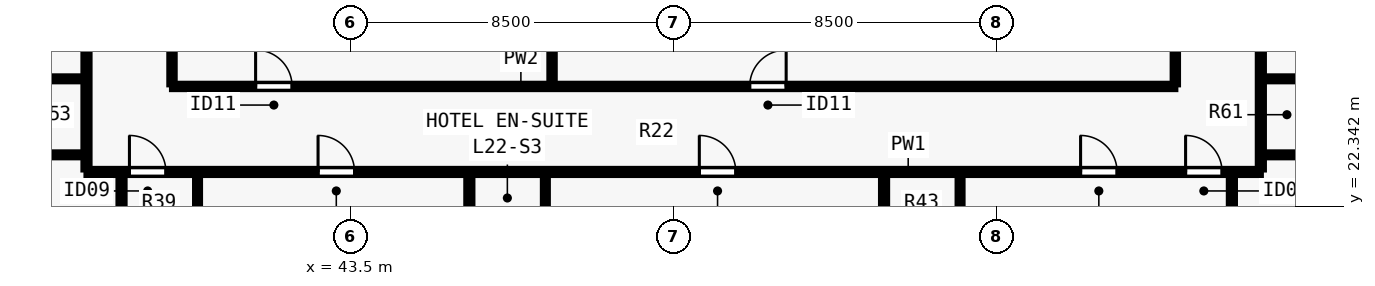
"""IFC4 building model, lengths in metres.
Left out: names, types, materials, properties, quantities, classifications, styles, units other than length and angle.
Written with IfcOpenShell. Run it as: python <this file> out.ifc"""

import sys

from ifc_helpers import new_model, si_unit, direction, frame, frame_2d, origin, place, context, subcontext, project, spatial, rectangle, extrude, element, fill, save


model = new_model("IFC4")
c1 = context("Model", 3, precision=1e-05, world=origin(), true_north=direction((0.0, 1.0)))
c2 = subcontext(c1, "Body", "Model", "MODEL_VIEW")
j1 = project(units=[si_unit("LENGTHUNIT", "METRE"), si_unit("PLANEANGLEUNIT", "RADIAN")], contexts=[c1])
p1 = place(None, origin())
s1 = spatial("IfcSite", under=j1, at=p1, CompositionType="ELEMENT")
p2 = place(p1, origin())
s2 = spatial("IfcBuilding", under=s1, at=p2, CompositionType="ELEMENT")
p3 = place(p2, frame((0.0, 0.0, 83.0)))
s3 = spatial("IfcBuildingStorey", under=s2, at=p3, CompositionType="ELEMENT", Elevation=83.0)
p4 = place(p3, frame((36.55, 23.25, 0.0), z_axis=(0.0, 0.0, 1.0), x_axis=(1.0, 0.0, 0.0)))
e1 = element("IfcWall", 1, at=p4, inside=s3, PredefinedType="PARTITIONING", context=c2, shape_type="SweptSolid", body=[
    extrude(rectangle(XDim=30.9, YDim=0.16, at=frame_2d((15.45, 0.0))), origin(), (0.0, 0.0, 1.0), 3.28),
])
p5 = place(p4, frame((1.13, 0.0, 0.0)))
e2 = element("IfcOpeningElement", 2, at=p5, cuts=e1, PredefinedType="OPENING", context=c2, shape_type="SweptSolid", body=[
    extrude(rectangle(XDim=0.96, YDim=2.15, at=frame_2d((0.48, 1.075))), frame((0.0, 0.09, 0.0), z_axis=(0.0, -1.0, 0.0), x_axis=(1.0, 0.0, 0.0)), (0.0, 0.0, 1.0), 0.18),
])
p6 = place(p4, frame((6.093, 0.0, 0.0)))
e3 = element("IfcOpeningElement", 3, at=p6, cuts=e1, PredefinedType="OPENING", context=c2, shape_type="SweptSolid", body=[
    extrude(rectangle(XDim=0.96, YDim=2.15, at=frame_2d((0.48, 1.075))), frame((0.0, 0.09, 0.0), z_axis=(0.0, -1.0, 0.0), x_axis=(1.0, 0.0, 0.0)), (0.0, 0.0, 1.0), 0.18),
])
p7 = place(p4, frame((16.125, 0.0, 0.0)))
e4 = element("IfcOpeningElement", 4, at=p7, cuts=e1, PredefinedType="OPENING", context=c2, shape_type="SweptSolid", body=[
    extrude(rectangle(XDim=0.96, YDim=2.15, at=frame_2d((0.48, 1.075))), frame((0.0, 0.09, 0.0), z_axis=(0.0, -1.0, 0.0), x_axis=(1.0, 0.0, 0.0)), (0.0, 0.0, 1.0), 0.18),
])
p8 = place(p4, frame((26.157, 0.0, 0.0)))
e5 = element("IfcOpeningElement", 5, at=p8, cuts=e1, PredefinedType="OPENING", context=c2, shape_type="SweptSolid", body=[
    extrude(rectangle(XDim=0.96, YDim=2.15, at=frame_2d((0.48, 1.075))), frame((0.0, 0.09, 0.0), z_axis=(0.0, -1.0, 0.0), x_axis=(1.0, 0.0, 0.0)), (0.0, 0.0, 1.0), 0.18),
])
p9 = place(p4, frame((28.92, 0.0, 0.0)))
e6 = element("IfcOpeningElement", 6, at=p9, cuts=e1, PredefinedType="OPENING", context=c2, shape_type="SweptSolid", body=[
    extrude(rectangle(XDim=0.96, YDim=2.15, at=frame_2d((0.48, 1.075))), frame((0.0, 0.09, 0.0), z_axis=(0.0, -1.0, 0.0), x_axis=(1.0, 0.0, 0.0)), (0.0, 0.0, 1.0), 0.18),
])
p10 = place(p3, frame((36.55, 23.315, 0.0), z_axis=(0.0, 0.0, 1.0), x_axis=(0.0, 1.0, 0.0)))
e7 = element("IfcWall", 7, at=p10, inside=s3, PredefinedType="PARTITIONING", context=c2, shape_type="SweptSolid", body=[
    extrude(rectangle(XDim=31.37, YDim=0.16, at=frame_2d((15.685, 0.0))), origin(), (0.0, 0.0, 1.0), 3.28),
])
p11 = place(p10, frame((4.848, 0.0, 0.0)))
e8 = element("IfcOpeningElement", 8, at=p11, cuts=e7, PredefinedType="OPENING", context=c2, shape_type="SweptSolid", body=[
    extrude(rectangle(XDim=0.96, YDim=2.15, at=frame_2d((0.48, 1.075))), frame((0.0, 0.09, 0.0), z_axis=(0.0, -1.0, 0.0), x_axis=(1.0, 0.0, 0.0)), (0.0, 0.0, 1.0), 0.18),
])
p12 = place(p10, frame((12.39, 0.0, 0.0)))
e9 = element("IfcOpeningElement", 9, at=p12, cuts=e7, PredefinedType="OPENING", context=c2, shape_type="SweptSolid", body=[
    extrude(rectangle(XDim=0.96, YDim=2.15, at=frame_2d((0.48, 1.075))), frame((0.0, 0.09, 0.0), z_axis=(0.0, -1.0, 0.0), x_axis=(1.0, 0.0, 0.0)), (0.0, 0.0, 1.0), 0.18),
])
p13 = place(p10, frame((20.265, 0.0, 0.0)))
e10 = element("IfcOpeningElement", 10, at=p13, cuts=e7, PredefinedType="OPENING", context=c2, shape_type="SweptSolid", body=[
    extrude(rectangle(XDim=0.96, YDim=2.15, at=frame_2d((0.48, 1.075))), frame((0.0, 0.09, 0.0), z_axis=(0.0, -1.0, 0.0), x_axis=(1.0, 0.0, 0.0)), (0.0, 0.0, 1.0), 0.18),
])
p14 = place(p10, frame((28.223, 0.0, 0.0)))
e11 = element("IfcOpeningElement", 11, at=p14, cuts=e7, PredefinedType="OPENING", context=c2, shape_type="SweptSolid", body=[
    extrude(rectangle(XDim=0.96, YDim=2.15, at=frame_2d((0.48, 1.075))), frame((0.0, 0.09, 0.0), z_axis=(0.0, -1.0, 0.0), x_axis=(1.0, 0.0, 0.0)), (0.0, 0.0, 1.0), 0.18),
])
p15 = place(p3, frame((67.45, 23.315, 0.0), z_axis=(0.0, 0.0, 1.0), x_axis=(0.0, 1.0, 0.0)))
e12 = element("IfcWall", 12, at=p15, inside=s3, PredefinedType="PARTITIONING", context=c2, shape_type="SweptSolid", body=[
    extrude(rectangle(XDim=31.37, YDim=0.16, at=frame_2d((15.685, 0.0))), origin(), (0.0, 0.0, 1.0), 3.28),
])
p16 = place(p15, frame((8.474, 0.0, 0.0)))
e13 = element("IfcOpeningElement", 13, at=p16, cuts=e12, PredefinedType="OPENING", context=c2, shape_type="SweptSolid", body=[
    extrude(rectangle(XDim=0.96, YDim=2.15, at=frame_2d((0.48, 1.075))), frame((0.0, 0.09, 0.0), z_axis=(0.0, -1.0, 0.0), x_axis=(1.0, 0.0, 0.0)), (0.0, 0.0, 1.0), 0.18),
])
p17 = place(p15, frame((23.974, 0.0, 0.0)))
e14 = element("IfcOpeningElement", 14, at=p17, cuts=e12, PredefinedType="OPENING", context=c2, shape_type="SweptSolid", body=[
    extrude(rectangle(XDim=0.96, YDim=2.15, at=frame_2d((0.48, 1.075))), frame((0.0, 0.09, 0.0), z_axis=(0.0, -1.0, 0.0), x_axis=(1.0, 0.0, 0.0)), (0.0, 0.0, 1.0), 0.18),
])
p18 = place(p3, frame((38.8, 25.5, 0.0), z_axis=(0.0, 0.0, 1.0), x_axis=(1.0, 0.0, 0.0)))
e15 = element("IfcWall", 15, at=p18, inside=s3, PredefinedType="PARTITIONING", context=c2, shape_type="SweptSolid", body=[
    extrude(rectangle(XDim=26.4, YDim=0.14, at=frame_2d((13.2, 0.0))), origin(), (0.0, 0.0, 1.0), 3.28),
])
p19 = place(p18, frame((2.2, 0.0, 0.0)))
e16 = element("IfcOpeningElement", 16, at=p19, cuts=e15, PredefinedType="OPENING", context=c2, shape_type="SweptSolid", body=[
    extrude(rectangle(XDim=0.96, YDim=2.12, at=frame_2d((0.48, 1.06))), frame((0.0, 0.08, 0.0), z_axis=(0.0, -1.0, 0.0), x_axis=(1.0, 0.0, 0.0)), (0.0, 0.0, 1.0), 0.16),
])
p20 = place(p18, frame((15.2, 0.0, 0.0)))
e17 = element("IfcOpeningElement", 17, at=p20, cuts=e15, PredefinedType="OPENING", context=c2, shape_type="SweptSolid", body=[
    extrude(rectangle(XDim=0.96, YDim=2.12, at=frame_2d((0.48, 1.06))), frame((0.0, 0.08, 0.0), z_axis=(0.0, -1.0, 0.0), x_axis=(1.0, 0.0, 0.0)), (0.0, 0.0, 1.0), 0.16),
])
p21 = place(p3, frame((38.8, 25.555, 0.0), z_axis=(0.0, 0.0, 1.0), x_axis=(0.0, 1.0, 0.0)))
e18 = element("IfcWall", 18, at=p21, inside=s3, PredefinedType="PARTITIONING", context=c2, shape_type="SweptSolid", body=[
    extrude(rectangle(XDim=13.195, YDim=0.14, at=frame_2d((6.598, 0.0))), origin(), (0.0, 0.0, 1.0), 3.28),
])
p22 = place(p21, frame((1.045, 0.0, 0.0)))
e19 = element("IfcOpeningElement", 19, at=p22, cuts=e18, PredefinedType="OPENING", context=c2, shape_type="SweptSolid", body=[
    extrude(rectangle(XDim=0.88, YDim=2.1, at=frame_2d((0.44, 1.05))), frame((0.0, 0.08, 0.0), z_axis=(0.0, -1.0, 0.0), x_axis=(1.0, 0.0, 0.0)), (0.0, 0.0, 1.0), 0.16),
])
p23 = place(p21, frame((10.245, 0.0, 0.0)))
e20 = element("IfcOpeningElement", 20, at=p23, cuts=e18, PredefinedType="OPENING", context=c2, shape_type="SweptSolid", body=[
    extrude(rectangle(XDim=0.88, YDim=2.1, at=frame_2d((0.44, 1.05))), frame((0.0, 0.08, 0.0), z_axis=(0.0, -1.0, 0.0), x_axis=(1.0, 0.0, 0.0)), (0.0, 0.0, 1.0), 0.16),
])
p24 = place(p3, frame((65.2, 25.555, 0.0), z_axis=(0.0, 0.0, 1.0), x_axis=(0.0, 1.0, 0.0)))
e21 = element("IfcWall", 21, at=p24, inside=s3, PredefinedType="PARTITIONING", context=c2, shape_type="SweptSolid", body=[
    extrude(rectangle(XDim=13.195, YDim=0.14, at=frame_2d((6.598, 0.0))), origin(), (0.0, 0.0, 1.0), 3.28),
])
p25 = place(p24, frame((2.445, 0.0, 0.0)))
e22 = element("IfcOpeningElement", 22, at=p25, cuts=e21, PredefinedType="OPENING", context=c2, shape_type="SweptSolid", body=[
    extrude(rectangle(XDim=0.88, YDim=2.1, at=frame_2d((0.44, 1.05))), frame((0.0, 0.08, 0.0), z_axis=(0.0, -1.0, 0.0), x_axis=(1.0, 0.0, 0.0)), (0.0, 0.0, 1.0), 0.16),
])
p26 = place(p3, frame((48.8, 25.555, 0.0), z_axis=(0.0, 0.0, 1.0), x_axis=(0.0, 1.0, 0.0)))
e23 = element("IfcWall", 23, at=p26, inside=s3, PredefinedType="PARTITIONING", context=c2, shape_type="SweptSolid", body=[
    extrude(rectangle(XDim=4.685, YDim=0.14, at=frame_2d((2.343, 0.0))), origin(), (0.0, 0.0, 1.0), 3.28),
])
p27 = place(p3, frame((37.472, 13.845, 0.0), z_axis=(0.0, 0.0, 1.0), x_axis=(0.0, 1.0, 0.0)))
e24 = element("IfcWall", 24, at=p27, inside=s3, PredefinedType="PARTITIONING", context=c2, shape_type="SweptSolid", body=[
    extrude(rectangle(XDim=9.34, YDim=0.16, at=frame_2d((4.67, 0.0))), origin(), (0.0, 0.0, 1.0), 3.28),
])
p28 = place(p3, frame((39.472, 20.95, 0.0), z_axis=(0.0, 0.0, 1.0), x_axis=(0.0, 1.0, 0.0)))
e25 = element("IfcWall", 25, at=p28, inside=s3, PredefinedType="PLUMBINGWALL", context=c2, shape_type="SweptSolid", body=[
    extrude(rectangle(XDim=2.235, YDim=0.13, at=frame_2d((1.118, 0.0))), origin(), (0.0, 0.0, 1.0), 3.28),
])
p29 = place(p3, frame((46.624, 13.845, 0.0), z_axis=(0.0, 0.0, 1.0), x_axis=(0.0, 1.0, 0.0)))
e26 = element("IfcWall", 26, at=p29, inside=s3, PredefinedType="PARTITIONING", context=c2, shape_type="SweptSolid", body=[
    extrude(rectangle(XDim=9.34, YDim=0.16, at=frame_2d((4.67, 0.0))), origin(), (0.0, 0.0, 1.0), 3.28),
])
p30 = place(p3, frame((48.624, 20.95, 0.0), z_axis=(0.0, 0.0, 1.0), x_axis=(0.0, 1.0, 0.0)))
e27 = element("IfcWall", 27, at=p30, inside=s3, PredefinedType="PLUMBINGWALL", context=c2, shape_type="SweptSolid", body=[
    extrude(rectangle(XDim=2.235, YDim=0.13, at=frame_2d((1.118, 0.0))), origin(), (0.0, 0.0, 1.0), 3.28),
])
p31 = place(p3, frame((57.536, 13.845, 0.0), z_axis=(0.0, 0.0, 1.0), x_axis=(0.0, 1.0, 0.0)))
e28 = element("IfcWall", 28, at=p31, inside=s3, PredefinedType="PARTITIONING", context=c2, shape_type="SweptSolid", body=[
    extrude(rectangle(XDim=9.34, YDim=0.16, at=frame_2d((4.67, 0.0))), origin(), (0.0, 0.0, 1.0), 3.28),
])
p32 = place(p3, frame((59.536, 20.95, 0.0), z_axis=(0.0, 0.0, 1.0), x_axis=(0.0, 1.0, 0.0)))
e29 = element("IfcWall", 29, at=p32, inside=s3, PredefinedType="PLUMBINGWALL", context=c2, shape_type="SweptSolid", body=[
    extrude(rectangle(XDim=2.235, YDim=0.13, at=frame_2d((1.118, 0.0))), origin(), (0.0, 0.0, 1.0), 3.28),
])
p33 = place(p3, frame((66.688, 13.845, 0.0), z_axis=(0.0, 0.0, 1.0), x_axis=(0.0, 1.0, 0.0)))
e30 = element("IfcWall", 30, at=p33, inside=s3, PredefinedType="PARTITIONING", context=c2, shape_type="SweptSolid", body=[
    extrude(rectangle(XDim=9.34, YDim=0.16, at=frame_2d((4.67, 0.0))), origin(), (0.0, 0.0, 1.0), 2.439),
])
p34 = place(p3, frame((34.25, 23.7, 0.0), z_axis=(0.0, 0.0, 1.0), x_axis=(1.0, 0.0, 0.0)))
e31 = element("IfcWall", 31, at=p34, inside=s3, PredefinedType="PLUMBINGWALL", context=c2, shape_type="SweptSolid", body=[
    extrude(rectangle(XDim=2.235, YDim=0.13, at=frame_2d((1.118, 0.0))), origin(), (0.0, 0.0, 1.0), 2.849),
])
p35 = place(p3, frame((34.25, 25.7, 0.0), z_axis=(0.0, 0.0, 1.0), x_axis=(1.0, 0.0, 0.0)))
e32 = element("IfcWall", 32, at=p35, inside=s3, PredefinedType="PLUMBINGWALL", context=c2, shape_type="SweptSolid", body=[
    extrude(rectangle(XDim=2.235, YDim=0.13, at=frame_2d((1.118, 0.0))), origin(), (0.0, 0.0, 1.0), 3.28),
])
p36 = place(p3, frame((67.515, 23.7, 0.0), z_axis=(0.0, 0.0, 1.0), x_axis=(1.0, 0.0, 0.0)))
e33 = element("IfcWall", 33, at=p36, inside=s3, PredefinedType="PLUMBINGWALL", context=c2, shape_type="SweptSolid", body=[
    extrude(rectangle(XDim=2.235, YDim=0.13, at=frame_2d((1.118, 0.0))), origin(), (0.0, 0.0, 1.0), 2.849),
])
p37 = place(p3, frame((67.515, 25.7, 0.0), z_axis=(0.0, 0.0, 1.0), x_axis=(1.0, 0.0, 0.0)))
e34 = element("IfcWall", 34, at=p37, inside=s3, PredefinedType="PLUMBINGWALL", context=c2, shape_type="SweptSolid", body=[
    extrude(rectangle(XDim=2.235, YDim=0.13, at=frame_2d((1.118, 0.0))), origin(), (0.0, 0.0, 1.0), 3.28),
])
p38 = place(p19, origin())
e35 = element("IfcDoor", 35, at=p38, inside=s3, OperationType="SINGLE_SWING_LEFT", PredefinedType="DOOR", context=c2, shape_type="SweptSolid", body=[
    extrude(rectangle(XDim=0.96, YDim=2.12, at=frame_2d((0.48, 1.06))), frame((0.0, 0.025, 0.0), z_axis=(0.0, -1.0, 0.0), x_axis=(1.0, 0.0, 0.0)), (0.0, 0.0, 1.0), 0.05),
])
fill(e16, e35)
p39 = place(p20, origin())
e36 = element("IfcDoor", 36, at=p39, inside=s3, OperationType="SINGLE_SWING_RIGHT", PredefinedType="DOOR", context=c2, shape_type="SweptSolid", body=[
    extrude(rectangle(XDim=0.96, YDim=2.12, at=frame_2d((0.48, 1.06))), frame((0.0, 0.025, 0.0), z_axis=(0.0, -1.0, 0.0), x_axis=(1.0, 0.0, 0.0)), (0.0, 0.0, 1.0), 0.05),
])
fill(e17, e36)
p40 = place(p5, origin())
e37 = element("IfcDoor", 37, at=p40, inside=s3, OperationType="SINGLE_SWING_LEFT", PredefinedType="DOOR", context=c2, shape_type="SweptSolid", body=[
    extrude(rectangle(XDim=0.96, YDim=2.15, at=frame_2d((0.48, 1.075))), frame((0.0, 0.025, 0.0), z_axis=(0.0, -1.0, 0.0), x_axis=(1.0, 0.0, 0.0)), (0.0, 0.0, 1.0), 0.05),
])
fill(e2, e37)
p41 = place(p6, origin())
e38 = element("IfcDoor", 38, at=p41, inside=s3, OperationType="SINGLE_SWING_LEFT", PredefinedType="DOOR", context=c2, shape_type="SweptSolid", body=[
    extrude(rectangle(XDim=0.96, YDim=2.15, at=frame_2d((0.48, 1.075))), frame((0.0, 0.025, 0.0), z_axis=(0.0, -1.0, 0.0), x_axis=(1.0, 0.0, 0.0)), (0.0, 0.0, 1.0), 0.05),
])
fill(e3, e38)
p42 = place(p7, origin())
e39 = element("IfcDoor", 39, at=p42, inside=s3, OperationType="SINGLE_SWING_LEFT", PredefinedType="DOOR", context=c2, shape_type="SweptSolid", body=[
    extrude(rectangle(XDim=0.96, YDim=2.15, at=frame_2d((0.48, 1.075))), frame((0.0, 0.025, 0.0), z_axis=(0.0, -1.0, 0.0), x_axis=(1.0, 0.0, 0.0)), (0.0, 0.0, 1.0), 0.05),
])
fill(e4, e39)
p43 = place(p8, origin())
e40 = element("IfcDoor", 40, at=p43, inside=s3, OperationType="SINGLE_SWING_LEFT", PredefinedType="DOOR", context=c2, shape_type="SweptSolid", body=[
    extrude(rectangle(XDim=0.96, YDim=2.15, at=frame_2d((0.48, 1.075))), frame((0.0, 0.025, 0.0), z_axis=(0.0, -1.0, 0.0), x_axis=(1.0, 0.0, 0.0)), (0.0, 0.0, 1.0), 0.05),
])
fill(e5, e40)
p44 = place(p9, origin())
e41 = element("IfcDoor", 41, at=p44, inside=s3, OperationType="SINGLE_SWING_LEFT", PredefinedType="DOOR", context=c2, shape_type="SweptSolid", body=[
    extrude(rectangle(XDim=0.96, YDim=2.15, at=frame_2d((0.48, 1.075))), frame((0.0, 0.025, 0.0), z_axis=(0.0, -1.0, 0.0), x_axis=(1.0, 0.0, 0.0)), (0.0, 0.0, 1.0), 0.05),
])
fill(e6, e41)
save(model, sys.argv[1])
